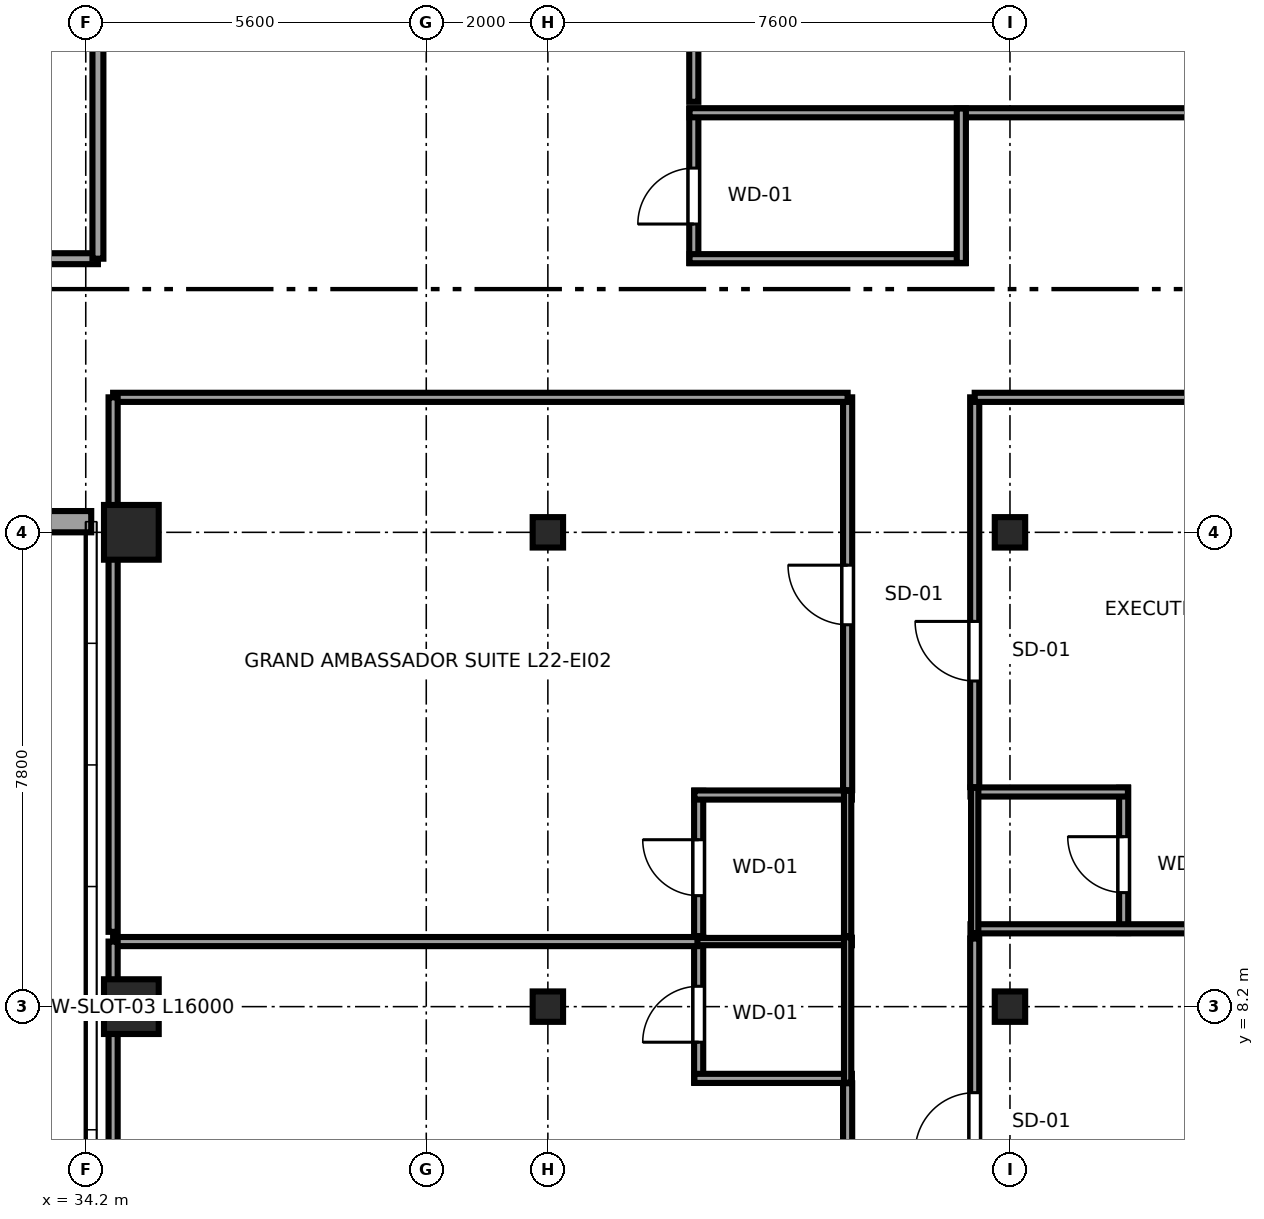
"""IFC4 building model, lengths in metres.
Left out: names, types, materials, properties, quantities, classifications, styles, units other than length and angle.
Written with IfcOpenShell. Run it as: python <this file> out.ifc"""

import sys

from ifc_helpers import new_model, si_unit, direction, frame, frame_2d, origin, origin_2d, place, context, subcontext, project, spatial, rectangle, i_section, extrude, source, transform, mapped, element, fill, save


model = new_model("IFC4")
c1 = context("Model", 3, precision=1e-05, world=origin(), true_north=direction((0.0, 1.0)))
c2 = subcontext(c1, "Body", "Model", "MODEL_VIEW")
j1 = project(units=[si_unit("LENGTHUNIT", "METRE"), si_unit("PLANEANGLEUNIT", "RADIAN")], contexts=[c1])
p1 = place(None, origin())
s1 = spatial("IfcSite", under=j1, at=p1, CompositionType="ELEMENT")
p2 = place(p1, origin())
s2 = spatial("IfcBuilding", under=s1, at=p2, CompositionType="ELEMENT")
p3 = place(p2, frame((0.0, 0.0, 88.8)))
s3 = spatial("IfcBuildingStorey", under=s2, at=p3, CompositionType="ELEMENT", Elevation=88.8)
m1 = source(origin(), c2, "Body", "SweptSolid", [
    extrude(rectangle(XDim=0.9, YDim=0.9, at=origin_2d()), origin(), (0.0, 0.0, 1.0), 3.55),
])
for number, where, z_axis, x_axis in (
    (1, (34.95, 8.2, 0.0), (0.0, 0.0, 1.0), (1.0, 0.0, 0.0)),
    (2, (34.95, 16.0, 0.0), (0.0, 0.0, 1.0), (1.0, 0.0, 0.0)),
):
    element("IfcColumn", number, at=place(p3, frame(where, z_axis=z_axis, x_axis=x_axis)), inside=s3, PredefinedType="COLUMN", context=c2, shape_type="MappedRepresentation", body=[
        mapped(m1, transform((0.0, 0.0, 0.0), x_axis=(1.0, 0.0, 0.0), y_axis=(0.0, 1.0, 0.0), z_axis=(0.0, 0.0, 1.0), scale=1.0)),
    ])
m2 = source(origin(), c2, "Body", "SweptSolid", [
    extrude(i_section(OverallWidth=0.5, OverallDepth=0.5, WebThickness=0.022, FlangeThickness=0.034, at=origin_2d()), origin(), (0.0, 0.0, 1.0), 3.55),
])
for number, where, z_axis, x_axis in (
    (3, (41.8, 8.2, 0.0), (0.0, 0.0, 1.0), (1.0, 0.0, 0.0)),
    (4, (41.8, 16.0, 0.0), (0.0, 0.0, 1.0), (1.0, 0.0, 0.0)),
    (5, (49.4, 8.2, 0.0), (0.0, 0.0, 1.0), (1.0, 0.0, 0.0)),
    (6, (49.4, 16.0, 0.0), (0.0, 0.0, 1.0), (1.0, 0.0, 0.0)),
):
    element("IfcColumn", number, at=place(p3, frame(where, z_axis=z_axis, x_axis=x_axis)), inside=s3, PredefinedType="COLUMN", context=c2, shape_type="MappedRepresentation", body=[
        mapped(m2, transform((0.0, 0.0, 0.0), x_axis=(1.0, 0.0, 0.0), y_axis=(0.0, 1.0, 0.0), z_axis=(0.0, 0.0, 1.0), scale=1.0)),
    ])
p4 = place(p3, frame((22.71, 16.175, 0.0), z_axis=(0.0, 0.0, 1.0), x_axis=(1.0, 0.0, 0.0)))
e7 = element("IfcWall", 7, at=p4, inside=s3, PredefinedType="SOLIDWALL", context=c2, shape_type="SweptSolid", body=[
    extrude(rectangle(XDim=11.58, YDim=0.35, at=frame_2d((5.79, 0.0))), origin(), (0.0, 0.0, 1.0), 2.748),
])
p5 = place(p4, frame((2.22, 0.0, 0.68)))
e8 = element("IfcOpeningElement", 8, at=p5, cuts=e7, PredefinedType="OPENING", context=c2, shape_type="SweptSolid", body=[
    extrude(rectangle(XDim=1.95, YDim=1.82, at=frame_2d((0.975, 0.91))), frame((0.0, 0.185, 0.0), z_axis=(0.0, -1.0, 0.0), x_axis=(1.0, 0.0, 0.0)), (0.0, 0.0, 1.0), 0.37),
])
p6 = place(p4, frame((7.41, 0.0, 0.68)))
e9 = element("IfcOpeningElement", 9, at=p6, cuts=e7, PredefinedType="OPENING", context=c2, shape_type="SweptSolid", body=[
    extrude(rectangle(XDim=1.95, YDim=1.82, at=frame_2d((0.975, 0.91))), frame((0.0, 0.185, 0.0), z_axis=(0.0, -1.0, 0.0), x_axis=(1.0, 0.0, 0.0)), (0.0, 0.0, 1.0), 0.37),
])
p7 = place(p3, frame((44.28, 6.95, 0.0), z_axis=(0.0, 0.0, 1.0), x_axis=(0.0, 1.0, 0.0)))
e10 = element("IfcWall", 10, at=p7, inside=s3, PredefinedType="PARTITIONING", context=c2, shape_type="SweptSolid", body=[
    extrude(rectangle(XDim=2.39, YDim=0.15, at=frame_2d((1.195, 0.0))), origin(), (0.0, 0.0, 1.0), 3.37),
])
p8 = place(p7, frame((0.665, 0.0, 0.0)))
e11 = element("IfcOpeningElement", 11, at=p8, cuts=e10, PredefinedType="OPENING", context=c2, shape_type="SweptSolid", body=[
    extrude(rectangle(XDim=0.92, YDim=2.01, at=frame_2d((0.46, 1.005))), frame((0.0, 0.085, 0.0), z_axis=(0.0, -1.0, 0.0), x_axis=(1.0, 0.0, 0.0)), (0.0, 0.0, 1.0), 0.17),
])
p9 = place(p3, frame((44.21, 7.02, 0.0), z_axis=(0.0, 0.0, 1.0), x_axis=(1.0, 0.0, 0.0)))
e12 = element("IfcWall", 12, at=p9, inside=s3, PredefinedType="PARTITIONING", context=c2, shape_type="SweptSolid", body=[
    extrude(rectangle(XDim=2.59, YDim=0.15, at=frame_2d((1.295, 0.0))), origin(), (0.0, 0.0, 1.0), 3.37),
])
p10 = place(p3, frame((44.21, 9.27, 0.0), z_axis=(0.0, 0.0, 1.0), x_axis=(1.0, 0.0, 0.0)))
e13 = element("IfcWall", 13, at=p10, inside=s3, PredefinedType="PLUMBINGWALL", context=c2, shape_type="SweptSolid", body=[
    extrude(rectangle(XDim=2.59, YDim=0.12, at=frame_2d((1.295, 0.0))), origin(), (0.0, 0.0, 1.0), 3.37),
])
p11 = place(p3, frame((46.73, 6.95, 0.0), z_axis=(0.0, 0.0, 1.0), x_axis=(0.0, 1.0, 0.0)))
e14 = element("IfcWall", 14, at=p11, inside=s3, PredefinedType="PLUMBINGWALL", context=c2, shape_type="SweptSolid", body=[
    extrude(rectangle(XDim=2.39, YDim=0.12, at=frame_2d((1.195, 0.0))), origin(), (0.0, 0.0, 1.0), 3.37),
])
p12 = place(p3, frame((44.28, 9.36, 0.0), z_axis=(0.0, 0.0, 1.0), x_axis=(0.0, 1.0, 0.0)))
e15 = element("IfcWall", 15, at=p12, inside=s3, PredefinedType="PARTITIONING", context=c2, shape_type="SweptSolid", body=[
    extrude(rectangle(XDim=2.39, YDim=0.15, at=frame_2d((1.195, 0.0))), origin(), (0.0, 0.0, 1.0), 3.37),
])
p13 = place(p12, frame((0.665, 0.0, 0.0)))
e16 = element("IfcOpeningElement", 16, at=p13, cuts=e15, PredefinedType="OPENING", context=c2, shape_type="SweptSolid", body=[
    extrude(rectangle(XDim=0.92, YDim=2.01, at=frame_2d((0.46, 1.005))), frame((0.0, 0.085, 0.0), z_axis=(0.0, -1.0, 0.0), x_axis=(1.0, 0.0, 0.0)), (0.0, 0.0, 1.0), 0.17),
])
p14 = place(p3, frame((44.21, 11.68, 0.0), z_axis=(0.0, 0.0, 1.0), x_axis=(1.0, 0.0, 0.0)))
e17 = element("IfcWall", 17, at=p14, inside=s3, PredefinedType="PARTITIONING", context=c2, shape_type="SweptSolid", body=[
    extrude(rectangle(XDim=2.59, YDim=0.15, at=frame_2d((1.295, 0.0))), origin(), (0.0, 0.0, 1.0), 3.37),
])
p15 = place(p3, frame((46.73, 9.36, 0.0), z_axis=(0.0, 0.0, 1.0), x_axis=(0.0, 1.0, 0.0)))
e18 = element("IfcWall", 18, at=p15, inside=s3, PredefinedType="PLUMBINGWALL", context=c2, shape_type="SweptSolid", body=[
    extrude(rectangle(XDim=2.39, YDim=0.12, at=frame_2d((1.195, 0.0))), origin(), (0.0, 0.0, 1.0), 3.37),
])
p16 = place(p3, frame((51.27, 9.41, 0.0), z_axis=(0.0, 0.0, 1.0), x_axis=(0.0, 1.0, 0.0)))
e19 = element("IfcWall", 19, at=p16, inside=s3, PredefinedType="PARTITIONING", context=c2, shape_type="SweptSolid", body=[
    extrude(rectangle(XDim=2.39, YDim=0.15, at=frame_2d((1.195, 0.0))), origin(), (0.0, 0.0, 1.0), 3.37),
])
p17 = place(p16, frame((0.665, 0.0, 0.0)))
e20 = element("IfcOpeningElement", 20, at=p17, cuts=e19, PredefinedType="OPENING", context=c2, shape_type="SweptSolid", body=[
    extrude(rectangle(XDim=0.92, YDim=2.01, at=frame_2d((0.46, 1.005))), frame((0.0, 0.085, 0.0), z_axis=(0.0, -1.0, 0.0), x_axis=(1.0, 0.0, 0.0)), (0.0, 0.0, 1.0), 0.17),
])
p18 = place(p3, frame((48.75, 9.48, 0.0), z_axis=(0.0, 0.0, 1.0), x_axis=(1.0, 0.0, 0.0)))
e21 = element("IfcWall", 21, at=p18, inside=s3, PredefinedType="PARTITIONING", context=c2, shape_type="SweptSolid", body=[
    extrude(rectangle(XDim=7.845, YDim=0.15, at=frame_2d((3.922, 0.0))), origin(), (0.0, 0.0, 1.0), 3.37),
])
p19 = place(p3, frame((48.75, 11.73, 0.0), z_axis=(0.0, 0.0, 1.0), x_axis=(1.0, 0.0, 0.0)))
e22 = element("IfcWall", 22, at=p19, inside=s3, PredefinedType="PARTITIONING", context=c2, shape_type="SweptSolid", body=[
    extrude(rectangle(XDim=2.59, YDim=0.15, at=frame_2d((1.295, 0.0))), origin(), (0.0, 0.0, 1.0), 3.37),
])
p20 = place(p3, frame((48.82, 9.41, 0.0), z_axis=(0.0, 0.0, 1.0), x_axis=(0.0, 1.0, 0.0)))
e23 = element("IfcWall", 23, at=p20, inside=s3, PredefinedType="PLUMBINGWALL", context=c2, shape_type="SweptSolid", body=[
    extrude(rectangle(XDim=2.39, YDim=0.12, at=frame_2d((1.195, 0.0))), origin(), (0.0, 0.0, 1.0), 3.37),
])
p21 = place(p3, frame((46.73, 0.405, 0.0), z_axis=(0.0, 0.0, 1.0), x_axis=(0.0, 1.0, 0.0)))
e24 = element("IfcWall", 24, at=p21, inside=s3, PredefinedType="PARTITIONING", context=c2, shape_type="SweptSolid", body=[
    extrude(rectangle(XDim=6.535, YDim=0.15, at=frame_2d((3.268, 0.0))), origin(), (0.0, 0.0, 1.0), 3.37),
])
p22 = place(p21, frame((2.785, 0.0, 0.0)))
e25 = element("IfcOpeningElement", 25, at=p22, cuts=e24, PredefinedType="OPENING", context=c2, shape_type="SweptSolid", body=[
    extrude(rectangle(XDim=0.98, YDim=2.12, at=frame_2d((0.49, 1.06))), frame((0.0, 0.085, 0.0), z_axis=(0.0, -1.0, 0.0), x_axis=(1.0, 0.0, 0.0)), (0.0, 0.0, 1.0), 0.17),
])
p23 = place(p3, frame((34.65, 9.27, 0.0), z_axis=(0.0, 0.0, 1.0), x_axis=(1.0, 0.0, 0.0)))
e26 = element("IfcWall", 26, at=p23, inside=s3, PredefinedType="PARTITIONING", context=c2, shape_type="SweptSolid", body=[
    extrude(rectangle(XDim=9.61, YDim=0.15, at=frame_2d((4.805, 0.0))), origin(), (0.0, 0.0, 1.0), 3.37),
])
p24 = place(p3, frame((34.65, 0.405, 0.0), z_axis=(0.0, 0.0, 1.0), x_axis=(0.0, 1.0, 0.0)))
e27 = element("IfcWall", 27, at=p24, inside=s3, PredefinedType="PARTITIONING", context=c2, shape_type="SweptSolid", body=[
    extrude(rectangle(XDim=8.865, YDim=0.15, at=frame_2d((4.433, 0.0))), origin(), (0.0, 0.0, 1.0), 3.37),
])
p25 = place(p3, frame((46.73, 11.76, 0.0), z_axis=(0.0, 0.0, 1.0), x_axis=(0.0, 1.0, 0.0)))
e28 = element("IfcWall", 28, at=p25, inside=s3, PredefinedType="PARTITIONING", context=c2, shape_type="SweptSolid", body=[
    extrude(rectangle(XDim=6.46, YDim=0.15, at=frame_2d((3.23, 0.0))), origin(), (0.0, 0.0, 1.0), 3.37),
])
p26 = place(p25, frame((2.72, 0.0, 0.0)))
e29 = element("IfcOpeningElement", 29, at=p26, cuts=e28, PredefinedType="OPENING", context=c2, shape_type="SweptSolid", body=[
    extrude(rectangle(XDim=0.98, YDim=2.12, at=frame_2d((0.49, 1.06))), frame((0.0, 0.085, 0.0), z_axis=(0.0, -1.0, 0.0), x_axis=(1.0, 0.0, 0.0)), (0.0, 0.0, 1.0), 0.17),
])
p27 = place(p3, frame((34.65, 18.22, 0.0), z_axis=(0.0, 0.0, 1.0), x_axis=(1.0, 0.0, 0.0)))
e30 = element("IfcWall", 30, at=p27, inside=s3, PredefinedType="PARTITIONING", context=c2, shape_type="SweptSolid", body=[
    extrude(rectangle(XDim=12.08, YDim=0.15, at=frame_2d((6.04, 0.0))), origin(), (0.0, 0.0, 1.0), 3.37),
])
p28 = place(p3, frame((34.65, 9.43, 0.0), z_axis=(0.0, 0.0, 1.0), x_axis=(0.0, 1.0, 0.0)))
e31 = element("IfcWall", 31, at=p28, inside=s3, PredefinedType="PARTITIONING", context=c2, shape_type="SweptSolid", body=[
    extrude(rectangle(XDim=8.79, YDim=0.15, at=frame_2d((4.395, 0.0))), origin(), (0.0, 0.0, 1.0), 3.37),
])
p29 = place(p3, frame((48.82, 3.31, 0.0), z_axis=(0.0, 0.0, 1.0), x_axis=(0.0, 1.0, 0.0)))
e32 = element("IfcWall", 32, at=p29, inside=s3, PredefinedType="PARTITIONING", context=c2, shape_type="SweptSolid", body=[
    extrude(rectangle(XDim=6.01, YDim=0.15, at=frame_2d((3.005, 0.0))), origin(), (0.0, 0.0, 1.0), 3.37),
])
p30 = place(p29, frame((2.495, 0.0, 0.0)))
e33 = element("IfcOpeningElement", 33, at=p30, cuts=e32, PredefinedType="OPENING", context=c2, shape_type="SweptSolid", body=[
    extrude(rectangle(XDim=0.98, YDim=2.12, at=frame_2d((0.49, 1.06))), frame((0.0, 0.085, 0.0), z_axis=(0.0, -1.0, 0.0), x_axis=(1.0, 0.0, 0.0)), (0.0, 0.0, 1.0), 0.17),
])
p31 = place(p3, frame((48.82, 11.81, 0.0), z_axis=(0.0, 0.0, 1.0), x_axis=(0.0, 1.0, 0.0)))
e34 = element("IfcWall", 34, at=p31, inside=s3, PredefinedType="PARTITIONING", context=c2, shape_type="SweptSolid", body=[
    extrude(rectangle(XDim=6.41, YDim=0.15, at=frame_2d((3.205, 0.0))), origin(), (0.0, 0.0, 1.0), 3.37),
])
p32 = place(p31, frame((1.745, 0.0, 0.0)))
e35 = element("IfcOpeningElement", 35, at=p32, cuts=e34, PredefinedType="OPENING", context=c2, shape_type="SweptSolid", body=[
    extrude(rectangle(XDim=0.98, YDim=2.12, at=frame_2d((0.49, 1.06))), frame((0.0, 0.085, 0.0), z_axis=(0.0, -1.0, 0.0), x_axis=(1.0, 0.0, 0.0)), (0.0, 0.0, 1.0), 0.17),
])
p33 = place(p3, frame((48.82, 18.22, 0.0), z_axis=(0.0, 0.0, 1.0), x_axis=(1.0, 0.0, 0.0)))
e36 = element("IfcWall", 36, at=p33, inside=s3, PredefinedType="PARTITIONING", context=c2, shape_type="SweptSolid", body=[
    extrude(rectangle(XDim=7.775, YDim=0.15, at=frame_2d((3.887, 0.0))), origin(), (0.0, 0.0, 1.0), 3.37),
])
p34 = place(p3, frame((44.2, 20.43, 0.0), z_axis=(0.0, 0.0, 1.0), x_axis=(0.0, 1.0, 0.0)))
e37 = element("IfcWall", 37, at=p34, inside=s3, PredefinedType="PARTITIONING", context=c2, shape_type="SweptSolid", body=[
    extrude(rectangle(XDim=2.54, YDim=0.15, at=frame_2d((1.27, 0.0))), origin(), (0.0, 0.0, 1.0), 3.37),
])
p35 = place(p34, frame((0.64, 0.0, 0.0)))
e38 = element("IfcOpeningElement", 38, at=p35, cuts=e37, PredefinedType="OPENING", context=c2, shape_type="SweptSolid", body=[
    extrude(rectangle(XDim=0.92, YDim=2.01, at=frame_2d((0.46, 1.005))), frame((0.0, 0.085, 0.0), z_axis=(0.0, -1.0, 0.0), x_axis=(1.0, 0.0, 0.0)), (0.0, 0.0, 1.0), 0.17),
])
p36 = place(p3, frame((44.13, 20.5, 0.0), z_axis=(0.0, 0.0, 1.0), x_axis=(1.0, 0.0, 0.0)))
e39 = element("IfcWall", 39, at=p36, inside=s3, PredefinedType="PARTITIONING", context=c2, shape_type="SweptSolid", body=[
    extrude(rectangle(XDim=4.54, YDim=0.15, at=frame_2d((2.27, 0.0))), origin(), (0.0, 0.0, 1.0), 3.37),
])
p37 = place(p3, frame((44.13, 22.9, 0.0), z_axis=(0.0, 0.0, 1.0), x_axis=(1.0, 0.0, 0.0)))
e40 = element("IfcWall", 40, at=p37, inside=s3, PredefinedType="PARTITIONING", context=c2, shape_type="SweptSolid", body=[
    extrude(rectangle(XDim=12.465, YDim=0.15, at=frame_2d((6.232, 0.0))), origin(), (0.0, 0.0, 1.0), 3.37),
])
p38 = place(p3, frame((48.6, 20.43, 0.0), z_axis=(0.0, 0.0, 1.0), x_axis=(0.0, 1.0, 0.0)))
e41 = element("IfcWall", 41, at=p38, inside=s3, PredefinedType="PARTITIONING", context=c2, shape_type="SweptSolid", body=[
    extrude(rectangle(XDim=2.54, YDim=0.15, at=frame_2d((1.27, 0.0))), origin(), (0.0, 0.0, 1.0), 3.37),
])
p39 = place(p3, frame((44.2, 23.08, 0.0), z_axis=(0.0, 0.0, 1.0), x_axis=(0.0, 1.0, 0.0)))
e42 = element("IfcWall", 42, at=p39, inside=s3, PredefinedType="PARTITIONING", context=c2, shape_type="SweptSolid", body=[
    extrude(rectangle(XDim=3.52, YDim=0.15, at=frame_2d((1.76, 0.0))), origin(), (0.0, 0.0, 1.0), 3.37),
])
p40 = place(p39, frame((0.935, 0.0, 0.0)))
e43 = element("IfcOpeningElement", 43, at=p40, cuts=e42, PredefinedType="OPENING", context=c2, shape_type="SweptSolid", body=[
    extrude(rectangle(XDim=1.65, YDim=2.15, at=frame_2d((0.825, 1.075))), frame((0.0, 0.085, 0.0), z_axis=(0.0, -1.0, 0.0), x_axis=(1.0, 0.0, 0.0)), (0.0, 0.0, 1.0), 0.17),
])
p41 = place(p3, frame((27.1, 20.5, 0.0), z_axis=(0.0, 0.0, 1.0), x_axis=(1.0, 0.0, 0.0)))
e44 = element("IfcWall", 44, at=p41, inside=s3, PredefinedType="PARTITIONING", context=c2, shape_type="SweptSolid", body=[
    extrude(rectangle(XDim=7.3, YDim=0.18, at=frame_2d((3.65, 0.0))), origin(), (0.0, 0.0, 1.0), 3.37),
])
p42 = place(p41, frame((2.825, 0.0, 0.0)))
e45 = element("IfcOpeningElement", 45, at=p42, cuts=e44, PredefinedType="OPENING", context=c2, shape_type="SweptSolid", body=[
    extrude(rectangle(XDim=1.65, YDim=2.15, at=frame_2d((0.825, 1.075))), frame((0.0, 0.1, 0.0), z_axis=(0.0, -1.0, 0.0), x_axis=(1.0, 0.0, 0.0)), (0.0, 0.0, 1.0), 0.2),
])
p43 = place(p3, frame((34.4, 20.5, 0.0), z_axis=(0.0, 0.0, 1.0), x_axis=(0.0, 1.0, 0.0)))
e46 = element("IfcWall", 46, at=p43, inside=s3, PredefinedType="PARTITIONING", context=c2, shape_type="SweptSolid", body=[
    extrude(rectangle(XDim=9.3, YDim=0.18, at=frame_2d((4.65, 0.0))), origin(), (0.0, 0.0, 1.0), 3.37),
])
m3 = source(origin(), c2, "Body", "SweptSolid", [
    extrude(rectangle(XDim=0.92, YDim=2.01, at=frame_2d((0.46, 1.005))), frame((0.0, 0.025, 0.0), z_axis=(0.0, -1.0, 0.0), x_axis=(1.0, 0.0, 0.0)), (0.0, 0.0, 1.0), 0.05),
])
p44 = place(p8, origin())
e47 = element("IfcDoor", 47, at=p44, inside=s3, OperationType="SINGLE_SWING_LEFT", PredefinedType="DOOR", context=c2, shape_type="MappedRepresentation", body=[
    mapped(m3, transform((0.0, 0.0, 0.0), x_axis=(1.0, 0.0, 0.0), y_axis=(0.0, 1.0, 0.0), z_axis=(0.0, 0.0, 1.0), scale=1.0)),
])
fill(e11, e47)
p45 = place(p13, origin())
e48 = element("IfcDoor", 48, at=p45, inside=s3, OperationType="SINGLE_SWING_RIGHT", PredefinedType="DOOR", context=c2, shape_type="MappedRepresentation", body=[
    mapped(m3, transform((0.0, 0.0, 0.0), x_axis=(1.0, 0.0, 0.0), y_axis=(0.0, 1.0, 0.0), z_axis=(0.0, 0.0, 1.0), scale=1.0)),
])
fill(e16, e48)
p46 = place(p17, origin())
e49 = element("IfcDoor", 49, at=p46, inside=s3, OperationType="SINGLE_SWING_RIGHT", PredefinedType="DOOR", context=c2, shape_type="MappedRepresentation", body=[
    mapped(m3, transform((0.0, 0.0, 0.0), x_axis=(1.0, 0.0, 0.0), y_axis=(0.0, 1.0, 0.0), z_axis=(0.0, 0.0, 1.0), scale=1.0)),
])
fill(e20, e49)
m4 = source(origin(), c2, "Body", "SweptSolid", [
    extrude(rectangle(XDim=0.98, YDim=2.12, at=frame_2d((0.49, 1.06))), frame((0.0, 0.025, 0.0), z_axis=(0.0, -1.0, 0.0), x_axis=(1.0, 0.0, 0.0)), (0.0, 0.0, 1.0), 0.05),
])
p47 = place(p26, origin())
e50 = element("IfcDoor", 50, at=p47, inside=s3, OperationType="SINGLE_SWING_RIGHT", PredefinedType="DOOR", context=c2, shape_type="MappedRepresentation", body=[
    mapped(m4, transform((0.0, 0.0, 0.0), x_axis=(1.0, 0.0, 0.0), y_axis=(0.0, 1.0, 0.0), z_axis=(0.0, 0.0, 1.0), scale=1.0)),
])
fill(e29, e50)
p48 = place(p30, origin())
e51 = element("IfcDoor", 51, at=p48, inside=s3, OperationType="SINGLE_SWING_LEFT", PredefinedType="DOOR", context=c2, shape_type="MappedRepresentation", body=[
    mapped(m4, transform((0.0, 0.0, 0.0), x_axis=(1.0, 0.0, 0.0), y_axis=(0.0, 1.0, 0.0), z_axis=(0.0, 0.0, 1.0), scale=1.0)),
])
fill(e33, e51)
p49 = place(p32, origin())
e52 = element("IfcDoor", 52, at=p49, inside=s3, OperationType="SINGLE_SWING_RIGHT", PredefinedType="DOOR", context=c2, shape_type="MappedRepresentation", body=[
    mapped(m4, transform((0.0, 0.0, 0.0), x_axis=(1.0, 0.0, 0.0), y_axis=(0.0, 1.0, 0.0), z_axis=(0.0, 0.0, 1.0), scale=1.0)),
])
fill(e35, e52)
p50 = place(p35, origin())
e53 = element("IfcDoor", 53, at=p50, inside=s3, OperationType="SINGLE_SWING_LEFT", PredefinedType="DOOR", context=c2, shape_type="MappedRepresentation", body=[
    mapped(m3, transform((0.0, 0.0, 0.0), x_axis=(1.0, 0.0, 0.0), y_axis=(0.0, 1.0, 0.0), z_axis=(0.0, 0.0, 1.0), scale=1.0)),
])
fill(e38, e53)
save(model, sys.argv[1])
